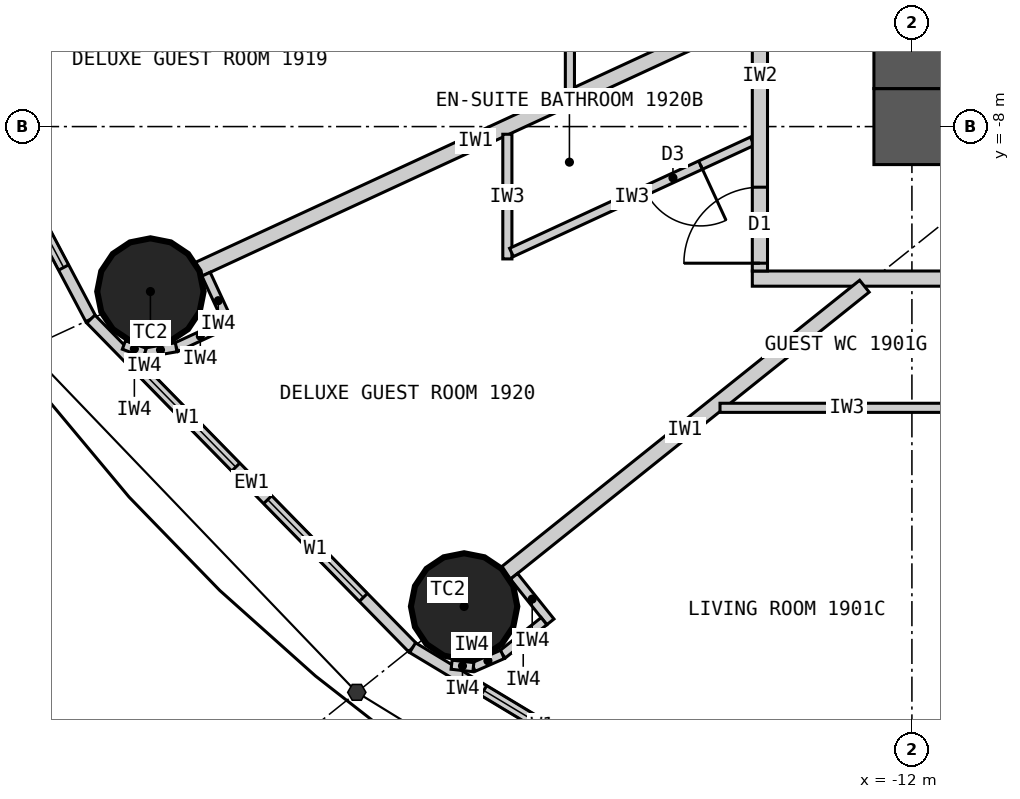
"""IFC4 building model, lengths in metres.
Left out: names, types, materials, properties, quantities, classifications, styles, units other than length and angle.
Written with IfcOpenShell. Run it as: python <this file> out.ifc"""

import sys

from ifc_helpers import new_model, si_unit, direction, frame, frame_2d, origin, origin_2d, place, context, subcontext, project, spatial, rectangle, circle, extrude, element, fill, save


model = new_model("IFC4")
c1 = context("Model", 3, precision=1e-05, world=origin(), true_north=direction((0.0, 1.0)))
c2 = subcontext(c1, "Body", "Model", "MODEL_VIEW")
j1 = project(units=[si_unit("LENGTHUNIT", "METRE"), si_unit("PLANEANGLEUNIT", "RADIAN")], contexts=[c1])
p1 = place(None, origin())
s1 = spatial("IfcSite", under=j1, at=p1, CompositionType="ELEMENT")
p2 = place(p1, origin())
s2 = spatial("IfcBuilding", under=s1, at=p2, CompositionType="ELEMENT")
p3 = place(p2, frame((0.0, 0.0, 77.1)))
s3 = spatial("IfcBuildingStorey", under=s2, at=p3, CompositionType="ELEMENT", Elevation=77.1)
for number, where, z_axis, x_axis in (
    (1, (-22.019, -10.17, 0.0), (0.0, 0.0, 1.0), (1.0, 0.0, 0.0)),
    (2, (-17.892, -14.313, 0.0), (0.0, 0.0, 1.0), (1.0, 0.0, 0.0)),
):
    element("IfcColumn", number, at=place(p3, frame(where, z_axis=z_axis, x_axis=x_axis)), inside=s3, PredefinedType="COLUMN", context=c2, shape_type="SweptSolid", body=[
        extrude(circle(Radius=0.7, at=origin_2d()), origin(), (0.0, 0.0, 1.0), 3.3),
    ])
p4 = place(p3, frame((12.5, -8.0, 0.0), z_axis=(0.0, 0.0, 1.0), x_axis=(-1.0, 0.0, 0.0)))
e3 = element("IfcWall", 3, at=p4, inside=s3, PredefinedType="SHEAR", context=c2, shape_type="SweptSolid", body=[
    extrude(rectangle(XDim=25.0, YDim=1.0, at=frame_2d((12.5, 0.0))), origin(), (0.0, 0.0, 1.0), 3.3),
])
p5 = place(p4, frame((11.2, 0.0, 0.0)))
e4 = element("IfcOpeningElement", 4, at=p5, cuts=e3, PredefinedType="OPENING", context=c2, shape_type="SweptSolid", body=[
    extrude(rectangle(XDim=1.2, YDim=2.2, at=frame_2d((0.6, 1.1))), frame((0.0, 0.51, 0.0), z_axis=(0.0, -1.0, 0.0), x_axis=(1.0, 0.0, 0.0)), (0.0, 0.0, 1.0), 1.02),
])
p6 = place(p4, frame((18.8, 0.0, 0.0)))
e5 = element("IfcOpeningElement", 5, at=p6, cuts=e3, PredefinedType="OPENING", context=c2, shape_type="SweptSolid", body=[
    extrude(rectangle(XDim=0.9, YDim=2.2, at=frame_2d((0.45, 1.1))), frame((0.0, 0.51, 0.0), z_axis=(0.0, -1.0, 0.0), x_axis=(1.0, 0.0, 0.0)), (0.0, 0.0, 1.0), 1.02),
])
p7 = place(p3, frame((-12.0, 7.5, 0.0), z_axis=(0.0, 0.0, 1.0), x_axis=(0.0, -1.0, 0.0)))
e6 = element("IfcWall", 6, at=p7, inside=s3, PredefinedType="SHEAR", context=c2, shape_type="SweptSolid", body=[
    extrude(rectangle(XDim=15.0, YDim=1.0, at=frame_2d((7.5, 0.0))), origin(), (0.0, 0.0, 1.0), 3.3),
])
p8 = place(p7, frame((6.6, 0.0, 0.0)))
e7 = element("IfcOpeningElement", 7, at=p8, cuts=e6, PredefinedType="OPENING", context=c2, shape_type="SweptSolid", body=[
    extrude(rectangle(XDim=1.8, YDim=2.2, at=frame_2d((0.9, 1.1))), frame((0.0, 0.51, 0.0), z_axis=(0.0, -1.0, 0.0), x_axis=(1.0, 0.0, 0.0)), (0.0, 0.0, 1.0), 1.02),
])
p9 = place(p3, frame((-25.482, -5.462, 0.0), z_axis=(0.0, 0.0, 1.0), x_axis=(0.467296867008, -0.884100468321, 0.0)))
e8 = element("IfcWall", 8, at=p9, inside=s3, PredefinedType="ELEMENTEDWALL", context=c2, shape_type="SweptSolid", body=[
    extrude(rectangle(XDim=5.734, YDim=0.15, at=frame_2d((2.867, 0.0))), origin(), (0.0, 0.0, 1.0), 3.12),
])
p10 = place(p9, frame((0.767, 0.0, 0.9)))
e9 = element("IfcOpeningElement", 9, at=p10, cuts=e8, PredefinedType="OPENING", context=c2, shape_type="SweptSolid", body=[
    extrude(rectangle(XDim=1.8, YDim=1.9, at=frame_2d((0.9, 0.95))), frame((0.0, 0.085, 0.0), z_axis=(0.0, -1.0, 0.0), x_axis=(1.0, 0.0, 0.0)), (0.0, 0.0, 1.0), 0.17),
])
p11 = place(p9, frame((3.167, 0.0, 0.9)))
e10 = element("IfcOpeningElement", 10, at=p11, cuts=e8, PredefinedType="OPENING", context=c2, shape_type="SweptSolid", body=[
    extrude(rectangle(XDim=1.8, YDim=1.9, at=frame_2d((0.9, 0.95))), frame((0.0, 0.085, 0.0), z_axis=(0.0, -1.0, 0.0), x_axis=(1.0, 0.0, 0.0)), (0.0, 0.0, 1.0), 0.17),
])
p12 = place(p3, frame((-22.803, -10.532, 0.0), z_axis=(0.0, 0.0, 1.0), x_axis=(0.699602905915, -0.714531856557, 0.0)))
e11 = element("IfcWall", 11, at=p12, inside=s3, PredefinedType="ELEMENTEDWALL", context=c2, shape_type="SweptSolid", body=[
    extrude(rectangle(XDim=6.051, YDim=0.15, at=frame_2d((3.025, 0.0))), origin(), (0.0, 0.0, 1.0), 3.12),
])
p13 = place(p12, frame((0.926, 0.0, 0.9)))
e12 = element("IfcOpeningElement", 12, at=p13, cuts=e11, PredefinedType="OPENING", context=c2, shape_type="SweptSolid", body=[
    extrude(rectangle(XDim=1.8, YDim=1.9, at=frame_2d((0.9, 0.95))), frame((0.0, 0.085, 0.0), z_axis=(0.0, -1.0, 0.0), x_axis=(1.0, 0.0, 0.0)), (0.0, 0.0, 1.0), 0.17),
])
p14 = place(p12, frame((3.325, 0.0, 0.9)))
e13 = element("IfcOpeningElement", 13, at=p14, cuts=e11, PredefinedType="OPENING", context=c2, shape_type="SweptSolid", body=[
    extrude(rectangle(XDim=1.8, YDim=1.9, at=frame_2d((0.9, 0.95))), frame((0.0, 0.085, 0.0), z_axis=(0.0, -1.0, 0.0), x_axis=(1.0, 0.0, 0.0)), (0.0, 0.0, 1.0), 0.17),
])
p15 = place(p3, frame((-18.57, -14.856, 0.0), z_axis=(0.0, 0.0, 1.0), x_axis=(0.856983180864, -0.515344377787, 0.0)))
e14 = element("IfcWall", 14, at=p15, inside=s3, PredefinedType="ELEMENTEDWALL", context=c2, shape_type="SweptSolid", body=[
    extrude(rectangle(XDim=6.386, YDim=0.15, at=frame_2d((3.193, 0.0))), origin(), (0.0, 0.0, 1.0), 3.12),
])
p16 = place(p15, frame((1.093, 0.0, 0.9)))
e15 = element("IfcOpeningElement", 15, at=p16, cuts=e14, PredefinedType="OPENING", context=c2, shape_type="SweptSolid", body=[
    extrude(rectangle(XDim=1.8, YDim=1.9, at=frame_2d((0.9, 0.95))), frame((0.0, 0.085, 0.0), z_axis=(0.0, -1.0, 0.0), x_axis=(1.0, 0.0, 0.0)), (0.0, 0.0, 1.0), 0.17),
])
p17 = place(p15, frame((3.493, 0.0, 0.9)))
e16 = element("IfcOpeningElement", 16, at=p17, cuts=e14, PredefinedType="OPENING", context=c2, shape_type="SweptSolid", body=[
    extrude(rectangle(XDim=1.8, YDim=1.9, at=frame_2d((0.9, 0.95))), frame((0.0, 0.085, 0.0), z_axis=(0.0, -1.0, 0.0), x_axis=(1.0, 0.0, 0.0)), (0.0, 0.0, 1.0), 0.17),
])
p18 = place(p3, frame((14.1, -10.0, 0.0), z_axis=(0.0, 0.0, 1.0), x_axis=(-1.0, 0.0, 0.0)))
e17 = element("IfcWall", 17, at=p18, inside=s3, PredefinedType="PARTITIONING", context=c2, shape_type="SweptSolid", body=[
    extrude(rectangle(XDim=28.2, YDim=0.2, at=frame_2d((14.1, 0.0))), origin(), (0.0, 0.0, 1.0), 3.12),
])
p19 = place(p18, frame((24.165, 0.0, 0.0)))
e18 = element("IfcOpeningElement", 18, at=p19, cuts=e17, PredefinedType="OPENING", context=c2, shape_type="SweptSolid", body=[
    extrude(rectangle(XDim=1.0, YDim=2.2, at=frame_2d((0.5, 1.1))), frame((0.0, 0.11, 0.0), z_axis=(0.0, -1.0, 0.0), x_axis=(1.0, 0.0, 0.0)), (0.0, 0.0, 1.0), 0.22),
])
p20 = place(p18, frame((14.923, 0.0, 0.0)))
e19 = element("IfcOpeningElement", 19, at=p20, cuts=e17, PredefinedType="OPENING", context=c2, shape_type="SweptSolid", body=[
    extrude(rectangle(XDim=1.0, YDim=2.2, at=frame_2d((0.5, 1.1))), frame((0.0, 0.11, 0.0), z_axis=(0.0, -1.0, 0.0), x_axis=(1.0, 0.0, 0.0)), (0.0, 0.0, 1.0), 0.22),
])
p21 = place(p18, frame((3.035, 0.0, 0.0)))
e20 = element("IfcOpeningElement", 20, at=p21, cuts=e17, PredefinedType="OPENING", context=c2, shape_type="SweptSolid", body=[
    extrude(rectangle(XDim=1.0, YDim=2.2, at=frame_2d((0.5, 1.1))), frame((0.0, 0.11, 0.0), z_axis=(0.0, -1.0, 0.0), x_axis=(1.0, 0.0, 0.0)), (0.0, 0.0, 1.0), 0.22),
])
p22 = place(p3, frame((-14.1, -6.512, 0.0), z_axis=(0.0, 0.0, 1.0), x_axis=(-0.907832871056, -0.419332181247, 0.0)))
e21 = element("IfcWall", 21, at=p22, inside=s3, PredefinedType="PARTITIONING", context=c2, shape_type="SweptSolid", body=[
    extrude(rectangle(XDim=8.023, YDim=0.2, at=frame_2d((4.011, 0.0))), origin(), (0.0, 0.0, 1.0), 2.32),
])
p23 = place(p3, frame((-12.625, -10.1, 0.0), z_axis=(0.0, 0.0, 1.0), x_axis=(-0.780892451574, -0.624665493744, 0.0)))
e22 = element("IfcWall", 22, at=p23, inside=s3, PredefinedType="PARTITIONING", context=c2, shape_type="SweptSolid", body=[
    extrude(rectangle(XDim=6.045, YDim=0.2, at=frame_2d((3.022, 0.0))), origin(), (0.0, 0.0, 1.0), 2.32),
])
p24 = place(p3, frame((-7.289, -10.1, 0.0), z_axis=(0.0, 0.0, 1.0), x_axis=(-0.585198353053, -0.810890182197, 0.0)))
e23 = element("IfcWall", 23, at=p24, inside=s3, PredefinedType="PARTITIONING", context=c2, shape_type="SweptSolid", body=[
    extrude(rectangle(XDim=8.36, YDim=0.2, at=frame_2d((4.18, 0.0))), origin(), (0.0, 0.0, 1.0), 2.32),
])
p25 = place(p24, frame((0.72, 0.0, 0.0)))
e24 = element("IfcOpeningElement", 24, at=p25, cuts=e23, PredefinedType="OPENING", context=c2, shape_type="SweptSolid", body=[
    extrude(rectangle(XDim=0.9, YDim=2.1, at=frame_2d((0.45, 1.05))), frame((0.0, 0.11, 0.0), z_axis=(0.0, -1.0, 0.0), x_axis=(1.0, 0.0, 0.0)), (0.0, 0.0, 1.0), 0.22),
])
p26 = place(p3, frame((-14.525, -11.7, 0.0), z_axis=(0.0, 0.0, 1.0), x_axis=(1.0, 0.0, 0.0)))
e25 = element("IfcWall", 25, at=p26, inside=s3, PredefinedType="PARTITIONING", context=c2, shape_type="SweptSolid", body=[
    extrude(rectangle(XDim=3.34, YDim=0.12, at=frame_2d((1.67, 0.0))), origin(), (0.0, 0.0, 1.0), 3.12),
])
p27 = place(p3, frame((-16.5, -7.521, 0.0), z_axis=(0.0, 0.0, 1.0), x_axis=(0.0, 1.0, 0.0)))
e26 = element("IfcWall", 26, at=p27, inside=s3, PredefinedType="PARTITIONING", context=c2, shape_type="SweptSolid", body=[
    extrude(rectangle(XDim=2.749, YDim=0.12, at=frame_2d((1.374, 0.0))), origin(), (0.0, 0.0, 1.0), 3.12),
])
p28 = place(p3, frame((-17.323, -8.101, 0.0), z_axis=(0.0, 0.0, 1.0), x_axis=(0.0, -1.0, 0.0)))
e27 = element("IfcWall", 27, at=p28, inside=s3, PredefinedType="PARTITIONING", context=c2, shape_type="SweptSolid", body=[
    extrude(rectangle(XDim=1.64, YDim=0.12, at=frame_2d((0.82, 0.0))), origin(), (0.0, 0.0, 1.0), 3.12),
])
p29 = place(p3, frame((-14.1, -8.193, 0.0), z_axis=(0.0, 0.0, 1.0), x_axis=(-0.907836493557, -0.419324338628, 0.0)))
e28 = element("IfcWall", 28, at=p29, inside=s3, PredefinedType="PARTITIONING", context=c2, shape_type="SweptSolid", body=[
    extrude(rectangle(XDim=3.49, YDim=0.12, at=frame_2d((1.745, 0.0))), origin(), (0.0, 0.0, 1.0), 3.12),
])
p30 = place(p29, frame((0.75, 0.0, 0.0)))
e29 = element("IfcOpeningElement", 29, at=p30, cuts=e28, PredefinedType="OPENING", context=c2, shape_type="SweptSolid", body=[
    extrude(rectangle(XDim=0.8, YDim=2.1, at=frame_2d((0.4, 1.05))), frame((0.0, 0.07, 0.0), z_axis=(0.0, -1.0, 0.0), x_axis=(1.0, 0.0, 0.0)), (0.0, 0.0, 1.0), 0.14),
])
p31 = place(p3, frame((-14.0, -4.772, 0.0), z_axis=(0.0, 0.0, 1.0), x_axis=(0.0, -1.0, 0.0)))
e30 = element("IfcWall", 30, at=p31, inside=s3, PredefinedType="PARTITIONING", context=c2, shape_type="SweptSolid", body=[
    extrude(rectangle(XDim=5.127, YDim=0.2, at=frame_2d((2.564, 0.0))), origin(), (0.0, 0.0, 1.0), 3.12),
])
p32 = place(p31, frame((4.025, 0.0, 0.0)))
e31 = element("IfcOpeningElement", 31, at=p32, cuts=e30, PredefinedType="OPENING", context=c2, shape_type="SweptSolid", body=[
    extrude(rectangle(XDim=1.0, YDim=2.2, at=frame_2d((0.5, 1.1))), frame((0.0, 0.11, 0.0), z_axis=(0.0, -1.0, 0.0), x_axis=(1.0, 0.0, 0.0)), (0.0, 0.0, 1.0), 0.22),
])
p33 = place(p3, frame((-21.287, -9.942, 0.0), z_axis=(0.0, 0.0, 1.0), x_axis=(0.419259891039, -0.907866258744, 0.0)))
e32 = element("IfcWall", 32, at=p33, inside=s3, PredefinedType="PARTITIONING", context=c2, shape_type="SweptSolid", body=[
    extrude(rectangle(XDim=0.768, YDim=0.12, at=frame_2d((0.384, 0.0))), origin(), (0.0, 0.0, 1.0), 3.12),
])
p34 = place(p3, frame((-21.045, -10.61, 0.0), z_axis=(0.0, 0.0, 1.0), x_axis=(-0.907877701396, -0.419235112208, 0.0)))
e33 = element("IfcWall", 33, at=p34, inside=s3, PredefinedType="PARTITIONING", context=c2, shape_type="SweptSolid", body=[
    extrude(rectangle(XDim=0.7, YDim=0.12, at=frame_2d((0.35, 0.0))), origin(), (0.0, 0.0, 1.0), 3.12),
])
p35 = place(p3, frame((-21.68, -10.903, 0.0), z_axis=(0.0, 0.0, 1.0), x_axis=(-0.985446622073, -0.169985161247, 0.0)))
e34 = element("IfcWall", 34, at=p35, inside=s3, PredefinedType="PARTITIONING", context=c2, shape_type="SweptSolid", body=[
    extrude(rectangle(XDim=0.418, YDim=0.12, at=frame_2d((0.209, 0.0))), origin(), (0.0, 0.0, 1.0), 3.12),
])
p36 = place(p3, frame((-22.092, -10.974, 0.0), z_axis=(0.0, 0.0, 1.0), x_axis=(-0.938428160676, 0.345474437912, 0.0)))
e35 = element("IfcWall", 35, at=p36, inside=s3, PredefinedType="PARTITIONING", context=c2, shape_type="SweptSolid", body=[
    extrude(rectangle(XDim=0.294, YDim=0.12, at=frame_2d((0.147, 0.0))), origin(), (0.0, 0.0, 1.0), 3.12),
])
p37 = place(p3, frame((-17.236, -13.917, 0.0), z_axis=(0.0, 0.0, 1.0), x_axis=(0.624695047554, -0.780868809443, 0.0)))
e36 = element("IfcWall", 36, at=p37, inside=s3, PredefinedType="PARTITIONING", context=c2, shape_type="SweptSolid", body=[
    extrude(rectangle(XDim=0.768, YDim=0.12, at=frame_2d((0.384, 0.0))), origin(), (0.0, 0.0, 1.0), 3.12),
])
p38 = place(p3, frame((-16.841, -14.507, 0.0), z_axis=(0.0, 0.0, 1.0), x_axis=(-0.780902834923, -0.62465251333, 0.0)))
e37 = element("IfcWall", 37, at=p38, inside=s3, PredefinedType="PARTITIONING", context=c2, shape_type="SweptSolid", body=[
    extrude(rectangle(XDim=0.7, YDim=0.12, at=frame_2d((0.35, 0.0))), origin(), (0.0, 0.0, 1.0), 3.12),
])
p39 = place(p3, frame((-17.387, -14.944, 0.0), z_axis=(0.0, 0.0, 1.0), x_axis=(-0.916036698064, -0.401094462441, 0.0)))
e38 = element("IfcWall", 38, at=p39, inside=s3, PredefinedType="PARTITIONING", context=c2, shape_type="SweptSolid", body=[
    extrude(rectangle(XDim=0.418, YDim=0.12, at=frame_2d((0.209, 0.0))), origin(), (0.0, 0.0, 1.0), 3.12),
])
p40 = place(p3, frame((-17.77, -15.112, 0.0), z_axis=(0.0, 0.0, 1.0), x_axis=(-0.993904401174, 0.110245368731, 0.0)))
e39 = element("IfcWall", 39, at=p40, inside=s3, PredefinedType="PARTITIONING", context=c2, shape_type="SweptSolid", body=[
    extrude(rectangle(XDim=0.288, YDim=0.12, at=frame_2d((0.144, 0.0))), origin(), (0.0, 0.0, 1.0), 3.12),
])
p41 = place(p11, origin())
e40 = element("IfcWindow", 40, at=p41, inside=s3, PartitioningType="SINGLE_PANEL", PredefinedType="WINDOW", context=c2, shape_type="SweptSolid", body=[
    extrude(rectangle(XDim=1.8, YDim=1.9, at=frame_2d((0.9, 0.95))), frame((0.0, 0.03, 0.0), z_axis=(0.0, -1.0, 0.0), x_axis=(1.0, 0.0, 0.0)), (0.0, 0.0, 1.0), 0.06),
])
fill(e10, e40)
p42 = place(p13, origin())
e41 = element("IfcWindow", 41, at=p42, inside=s3, PartitioningType="SINGLE_PANEL", PredefinedType="WINDOW", context=c2, shape_type="SweptSolid", body=[
    extrude(rectangle(XDim=1.8, YDim=1.9, at=frame_2d((0.9, 0.95))), frame((0.0, 0.03, 0.0), z_axis=(0.0, -1.0, 0.0), x_axis=(1.0, 0.0, 0.0)), (0.0, 0.0, 1.0), 0.06),
])
fill(e12, e41)
p43 = place(p14, origin())
e42 = element("IfcWindow", 42, at=p43, inside=s3, PartitioningType="SINGLE_PANEL", PredefinedType="WINDOW", context=c2, shape_type="SweptSolid", body=[
    extrude(rectangle(XDim=1.8, YDim=1.9, at=frame_2d((0.9, 0.95))), frame((0.0, 0.03, 0.0), z_axis=(0.0, -1.0, 0.0), x_axis=(1.0, 0.0, 0.0)), (0.0, 0.0, 1.0), 0.06),
])
fill(e13, e42)
p44 = place(p16, origin())
e43 = element("IfcWindow", 43, at=p44, inside=s3, PartitioningType="SINGLE_PANEL", PredefinedType="WINDOW", context=c2, shape_type="SweptSolid", body=[
    extrude(rectangle(XDim=1.8, YDim=1.9, at=frame_2d((0.9, 0.95))), frame((0.0, 0.03, 0.0), z_axis=(0.0, -1.0, 0.0), x_axis=(1.0, 0.0, 0.0)), (0.0, 0.0, 1.0), 0.06),
])
fill(e15, e43)
p45 = place(p30, origin())
e44 = element("IfcDoor", 44, at=p45, inside=s3, OperationType="SINGLE_SWING_LEFT", PredefinedType="DOOR", context=c2, shape_type="SweptSolid", body=[
    extrude(rectangle(XDim=0.8, YDim=2.1, at=frame_2d((0.4, 1.05))), frame((0.0, 0.025, 0.0), z_axis=(0.0, -1.0, 0.0), x_axis=(1.0, 0.0, 0.0)), (0.0, 0.0, 1.0), 0.05),
])
fill(e29, e44)
p46 = place(p32, origin())
e45 = element("IfcDoor", 45, at=p46, inside=s3, OperationType="SINGLE_SWING_RIGHT", PredefinedType="DOOR", context=c2, shape_type="SweptSolid", body=[
    extrude(rectangle(XDim=1.0, YDim=2.2, at=frame_2d((0.5, 1.1))), frame((0.0, 0.025, 0.0), z_axis=(0.0, -1.0, 0.0), x_axis=(1.0, 0.0, 0.0)), (0.0, 0.0, 1.0), 0.05),
])
fill(e31, e45)
save(model, sys.argv[1])
